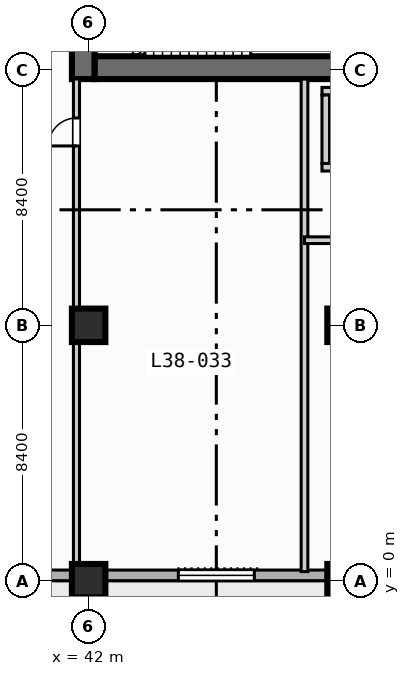
"""IFC4 building model, lengths in metres.
Left out: names, types, materials, properties, quantities, classifications, styles, units other than length and angle.
Written with IfcOpenShell. Run it as: python <this file> out.ifc"""

import sys

from ifc_helpers import new_model, si_unit, direction, frame, frame_2d, origin, origin_2d, place, context, subcontext, project, spatial, rectangle, extrude, element, fill, save


model = new_model("IFC4")
c1 = context("Model", 3, precision=1e-05, world=origin(), true_north=direction((0.0, 1.0)))
c2 = subcontext(c1, "Body", "Model", "MODEL_VIEW")
j1 = project(units=[si_unit("LENGTHUNIT", "METRE"), si_unit("PLANEANGLEUNIT", "RADIAN")], contexts=[c1])
p1 = place(None, origin())
s1 = spatial("IfcSite", under=j1, at=p1, CompositionType="ELEMENT")
p2 = place(p1, origin())
s2 = spatial("IfcBuilding", under=s1, at=p2, CompositionType="ELEMENT")
p3 = place(p2, frame((0.0, 0.0, 157.6)))
s3 = spatial("IfcBuildingStorey", under=s2, at=p3, CompositionType="ELEMENT", Elevation=157.6)
p4 = place(p3, frame((41.825, 16.5, 0.0), z_axis=(0.0, 0.0, 1.0), x_axis=(0.0, 1.0, 0.0)))
e1 = element("IfcWall", 1, at=p4, inside=s3, PredefinedType="SHEAR", context=c2, shape_type="SweptSolid", body=[
    extrude(rectangle(XDim=1.5, YDim=0.75, at=frame_2d((0.75, 0.0))), origin(), (0.0, 0.0, 1.0), 4.05),
])
p5 = place(p3, frame((42.2, 16.875, 0.0), z_axis=(0.0, 0.0, 1.0), x_axis=(1.0, 0.0, 0.0)))
e2 = element("IfcWall", 2, at=p5, inside=s3, PredefinedType="SHEAR", context=c2, shape_type="SweptSolid", body=[
    extrude(rectangle(XDim=16.35, YDim=0.75, at=frame_2d((8.175, 0.0))), origin(), (0.0, 0.0, 1.0), 4.05),
])
for number, where, z_axis, x_axis in (
    (3, (42.0, 0.0, 0.0), (0.0, 0.0, 1.0), (1.0, 0.0, 0.0)),
    (4, (42.0, 8.4, 0.0), (0.0, 0.0, 1.0), (1.0, 0.0, 0.0)),
    (5, (50.4, 0.0, 0.0), (0.0, 0.0, 1.0), (1.0, 0.0, 0.0)),
    (6, (50.4, 8.4, 0.0), (0.0, 0.0, 1.0), (1.0, 0.0, 0.0)),
):
    element("IfcColumn", number, at=place(p3, frame(where, z_axis=z_axis, x_axis=x_axis)), inside=s3, PredefinedType="COLUMN", context=c2, shape_type="SweptSolid", body=[
        extrude(rectangle(XDim=1.1, YDim=1.1, at=origin_2d()), origin(), (0.0, 0.0, 1.0), 4.4),
    ])
p6 = place(p3, frame((72.425, 0.175, 0.0), z_axis=(0.0, 0.0, 1.0), x_axis=(-1.0, 0.0, 0.0)))
e7 = element("IfcWall", 7, at=p6, inside=s3, PredefinedType="STANDARD", context=c2, shape_type="SweptSolid", body=[
    extrude(rectangle(XDim=69.25, YDim=0.35, at=frame_2d((34.625, 0.0))), origin(), (0.0, 0.0, 1.0), 4.05),
])
p7 = place(p6, frame((50.725, 0.0, 0.0)))
e8 = element("IfcOpeningElement", 8, at=p7, cuts=e7, PredefinedType="OPENING", context=c2, shape_type="SweptSolid", body=[
    extrude(rectangle(XDim=1.4, YDim=2.2, at=frame_2d((0.7, 1.1))), frame((0.0, 0.185, 0.0), z_axis=(0.0, -1.0, 0.0), x_axis=(1.0, 0.0, 0.0)), (0.0, 0.0, 1.0), 0.37),
])
p8 = place(p6, frame((24.975, 0.0, 0.85)))
e9 = element("IfcOpeningElement", 9, at=p8, cuts=e7, PredefinedType="OPENING", context=c2, shape_type="SweptSolid", body=[
    extrude(rectangle(XDim=2.5, YDim=2.2, at=frame_2d((1.25, 1.1))), frame((0.0, 0.185, 0.0), z_axis=(0.0, -1.0, 0.0), x_axis=(1.0, 0.0, 0.0)), (0.0, 0.0, 1.0), 0.37),
])
p9 = place(p6, frame((8.175, 0.0, 0.85)))
e10 = element("IfcOpeningElement", 10, at=p9, cuts=e7, PredefinedType="OPENING", context=c2, shape_type="SweptSolid", body=[
    extrude(rectangle(XDim=2.5, YDim=2.2, at=frame_2d((1.25, 1.1))), frame((0.0, 0.185, 0.0), z_axis=(0.0, -1.0, 0.0), x_axis=(1.0, 0.0, 0.0)), (0.0, 0.0, 1.0), 0.37),
])
p10 = place(p3, frame((49.675, 13.6, 0.0), z_axis=(0.0, 0.0, 1.0), x_axis=(1.0, 0.0, 0.0)))
e11 = element("IfcWall", 11, at=p10, inside=s3, PredefinedType="SOLIDWALL", context=c2, shape_type="SweptSolid", body=[
    extrude(rectangle(XDim=2.25, YDim=0.25, at=frame_2d((1.125, 0.0))), origin(), (0.0, 0.0, 1.0), 4.05),
])
p11 = place(p10, frame((0.4, 0.0, 0.0)))
e12 = element("IfcOpeningElement", 12, at=p11, cuts=e11, PredefinedType="OPENING", context=c2, shape_type="SweptSolid", body=[
    extrude(rectangle(XDim=1.1, YDim=2.15, at=frame_2d((0.55, 1.075))), frame((0.0, 0.135, 0.0), z_axis=(0.0, -1.0, 0.0), x_axis=(1.0, 0.0, 0.0)), (0.0, 0.0, 1.0), 0.27),
])
for number, where, z_axis, x_axis in (
    (13, (49.675, 16.1, 0.0), (0.0, 0.0, 1.0), (1.0, 0.0, 0.0)),
    (14, (49.8, 13.725, 0.0), (0.0, 0.0, 1.0), (0.0, 1.0, 0.0)),
):
    element("IfcWall", number, at=place(p3, frame(where, z_axis=z_axis, x_axis=x_axis)), inside=s3, PredefinedType="SOLIDWALL", context=c2, shape_type="SweptSolid", body=[
        extrude(rectangle(XDim=2.25, YDim=0.25, at=frame_2d((1.125, 0.0))), origin(), (0.0, 0.0, 1.0), 4.05),
    ])
p12 = place(p3, frame((41.6, 0.3, 0.0), z_axis=(0.0, 0.0, 1.0), x_axis=(0.0, 1.0, 0.0)))
e15 = element("IfcWall", 15, at=p12, inside=s3, PredefinedType="PARTITIONING", context=c2, shape_type="SweptSolid", body=[
    extrude(rectangle(XDim=16.2, YDim=0.2, at=frame_2d((8.1, 0.0))), origin(), (0.0, 0.0, 1.0), 4.05),
])
p13 = place(p12, frame((14.0, 0.0, 0.0)))
e16 = element("IfcOpeningElement", 16, at=p13, cuts=e15, PredefinedType="OPENING", context=c2, shape_type="SweptSolid", body=[
    extrude(rectangle(XDim=0.92, YDim=2.1, at=frame_2d((0.46, 1.05))), frame((0.0, 0.11, 0.0), z_axis=(0.0, -1.0, 0.0), x_axis=(1.0, 0.0, 0.0)), (0.0, 0.0, 1.0), 0.22),
])
p14 = place(p3, frame((49.1, 0.3, 0.0), z_axis=(0.0, 0.0, 1.0), x_axis=(0.0, 1.0, 0.0)))
e17 = element("IfcWall", 17, at=p14, inside=s3, PredefinedType="PARTITIONING", context=c2, shape_type="SweptSolid", body=[
    extrude(rectangle(XDim=16.2, YDim=0.22, at=frame_2d((8.1, 0.0))), origin(), (0.0, 0.0, 1.0), 4.05),
])
p15 = place(p3, frame((49.1, 11.2, 0.0), z_axis=(0.0, 0.0, 1.0), x_axis=(1.0, 0.0, 0.0)))
e18 = element("IfcWall", 18, at=p15, inside=s3, PredefinedType="PARTITIONING", context=c2, shape_type="SweptSolid", body=[
    extrude(rectangle(XDim=9.3, YDim=0.22, at=frame_2d((4.65, 0.0))), origin(), (0.0, 0.0, 1.0), 4.05),
])
p16 = place(p8, origin())
e19 = element("IfcWindow", 19, at=p16, inside=s3, PartitioningType="SINGLE_PANEL", PredefinedType="WINDOW", context=c2, shape_type="SweptSolid", body=[
    extrude(rectangle(XDim=2.5, YDim=2.2, at=frame_2d((1.25, 1.1))), frame((0.0, 0.03, 0.0), z_axis=(0.0, -1.0, 0.0), x_axis=(1.0, 0.0, 0.0)), (0.0, 0.0, 1.0), 0.06),
])
fill(e9, e19)
p17 = place(p13, origin())
e20 = element("IfcDoor", 20, at=p17, inside=s3, OperationType="SINGLE_SWING_LEFT", PredefinedType="DOOR", context=c2, shape_type="SweptSolid", body=[
    extrude(rectangle(XDim=0.92, YDim=2.1, at=frame_2d((0.46, 1.05))), frame((0.0, 0.025, 0.0), z_axis=(0.0, -1.0, 0.0), x_axis=(1.0, 0.0, 0.0)), (0.0, 0.0, 1.0), 0.05),
])
fill(e16, e20)
save(model, sys.argv[1])
